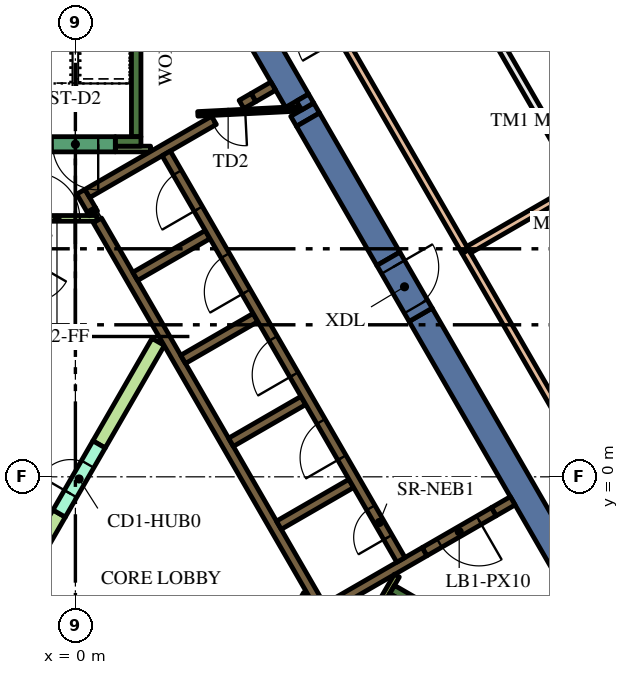
"""IFC4 building model, lengths in metres.
Left out: names, types, materials, properties, quantities, classifications, styles, units other than length and angle.
Written with IfcOpenShell. Run it as: python <this file> out.ifc"""

import sys

from ifc_helpers import new_model, si_unit, direction, frame, frame_2d, origin, place, context, subcontext, project, spatial, polyline, rectangle, outline, extrude, element, fill, save


model = new_model("IFC4")
c1 = context("Model", 3, precision=1e-05, world=origin(), true_north=direction((0.0, 1.0)))
c2 = subcontext(c1, "Body", "Model", "MODEL_VIEW")
j1 = project(units=[si_unit("LENGTHUNIT", "METRE"), si_unit("PLANEANGLEUNIT", "RADIAN")], contexts=[c1])
p1 = place(None, origin())
s1 = spatial("IfcSite", under=j1, at=p1, CompositionType="ELEMENT")
p2 = place(p1, origin())
s2 = spatial("IfcBuilding", under=s1, at=p2, CompositionType="ELEMENT")
p3 = place(p2, frame((0.0, 0.0, 261.6)))
s3 = spatial("IfcBuildingStorey", under=s2, at=p3, CompositionType="ELEMENT", Elevation=261.6)
p4 = place(p3, frame((9.085, 4.264, 0.0), z_axis=(0.0, 0.0, 1.0), x_axis=(0.499998082512, -0.866026510844, 0.0)))
e1 = element("IfcWall", 1, at=p4, inside=s3, PredefinedType="SOLIDWALL", context=c2, shape_type="SweptSolid", body=[
    extrude(rectangle(XDim=12.472, YDim=0.7, at=frame_2d((6.236, 0.0))), origin(), (0.0, 0.0, 1.0), 5.4),
])
p5 = place(p3, frame((6.12, 9.399, 0.0), z_axis=(0.0, 0.0, 1.0), x_axis=(-0.499792463624, 0.866145191815, 0.0)))
e2 = element("IfcWall", 2, at=p5, inside=s3, PredefinedType="SOLIDWALL", context=c2, shape_type="SweptSolid", body=[
    extrude(rectangle(XDim=0.302, YDim=0.7, at=frame_2d((0.151, 0.0))), origin(), (0.0, 0.0, 1.0), 5.4),
])
p6 = place(p3, frame((5.833, 9.896, 0.0), z_axis=(0.0, 0.0, 1.0), x_axis=(-0.499987949039, 0.866032361298, 0.0)))
e3 = element("IfcWall", 3, at=p6, inside=s3, PredefinedType="SOLIDWALL", context=c2, shape_type="SweptSolid", body=[
    extrude(rectangle(XDim=7.668, YDim=0.7, at=frame_2d((3.834, 0.0))), origin(), (0.0, 0.0, 1.0), 5.4),
])
p7 = place(p3, origin())
e4 = element("IfcWall", 4, at=p7, inside=s3, PredefinedType="SOLIDWALL", context=c2, shape_type="SweptSolid", body=[
    extrude(outline(polyline([(6.137, 10.07), (6.271, 9.838), (5.952, 9.654), (5.819, 9.886), (6.137, 10.07)])), origin(), (0.0, 0.0, 1.0), 5.4),
])
p8 = place(p3, frame((6.121, 9.398, 0.0), z_axis=(0.0, 0.0, 1.0), x_axis=(0.499995697976, -0.866027887545, 0.0)))
e5 = element("IfcWall", 5, at=p8, inside=s3, PredefinedType="SOLIDWALL", context=c2, shape_type="SweptSolid", body=[
    extrude(rectangle(XDim=4.228, YDim=0.7, at=frame_2d((2.114, 0.0))), origin(), (0.0, 0.0, 1.0), 5.4),
])
p9 = place(p3, frame((8.334, -2.964, 0.0), z_axis=(0.0, 0.0, 1.0), x_axis=(0.866016039709, -0.500016218704, 0.0)))
e6 = element("IfcWall", 6, at=p9, inside=s3, PredefinedType="SOLIDWALL", context=c2, shape_type="SweptSolid", body=[
    extrude(rectangle(XDim=7.05, YDim=0.25, at=frame_2d((3.525, 0.0))), origin(), (0.0, 0.0, 1.0), 5.4),
])
p10 = place(p3, frame((8.168, -3.503, 0.0), z_axis=(0.0, 0.0, 1.0), x_axis=(0.49972245349, 0.866185586049, 0.0)))
e7 = element("IfcWall", 7, at=p10, inside=s3, PredefinedType="SOLIDWALL", context=c2, shape_type="SweptSolid", body=[
    extrude(rectangle(XDim=0.425, YDim=0.25, at=frame_2d((0.212, 0.0))), origin(), (0.0, 0.0, 1.0), 5.4),
])
p11 = place(p3, frame((1.6, 8.95, 0.0), z_axis=(0.0, 0.0, 1.0), x_axis=(0.0, 1.0, 0.0)))
e8 = element("IfcWall", 8, at=p11, inside=s3, PredefinedType="SOLIDWALL", context=c2, shape_type="SweptSolid", body=[
    extrude(rectangle(XDim=6.8, YDim=0.25, at=frame_2d((3.4, 0.0))), origin(), (0.0, 0.0, 1.0), 5.4),
])
p12 = place(p3, frame((1.05, 8.825, 0.0), z_axis=(0.0, 0.0, 1.0), x_axis=(1.0, 0.0, 0.0)))
e9 = element("IfcWall", 9, at=p12, inside=s3, PredefinedType="SOLIDWALL", context=c2, shape_type="SweptSolid", body=[
    extrude(rectangle(XDim=0.675, YDim=0.25, at=frame_2d((0.337, 0.0))), origin(), (0.0, 0.0, 1.0), 5.4),
])
p13 = place(p3, frame((11.507, -0.631, 0.0), z_axis=(0.0, 0.0, 1.0), x_axis=(-0.866093731455, -0.499881634324, 0.0)))
e10 = element("IfcWall", 10, at=p13, inside=s3, PredefinedType="SOLIDWALL", context=c2, shape_type="SweptSolid", body=[
    extrude(rectangle(XDim=0.575, YDim=0.25, at=frame_2d((0.288, 0.0))), origin(), (0.0, 0.0, 1.0), 5.4),
])
p14 = place(p3, frame((0.473, 6.93, 0.0), z_axis=(0.0, 0.0, 1.0), x_axis=(-0.49972245349, 0.866185586049, 0.0)))
e11 = element("IfcWall", 11, at=p14, inside=s3, PredefinedType="SOLIDWALL", context=c2, shape_type="SweptSolid", body=[
    extrude(rectangle(XDim=0.11, YDim=0.25, at=frame_2d((0.055, 0.0))), origin(), (0.0, 0.0, 1.0), 5.4),
])
p15 = place(p3, frame((6.568, -3.627, 0.0), z_axis=(0.0, 0.0, 1.0), x_axis=(-0.499999455981, 0.866025717874, 0.0)))
e12 = element("IfcWall", 12, at=p15, inside=s3, PredefinedType="SOLIDWALL", context=c2, shape_type="SweptSolid", body=[
    extrude(rectangle(XDim=11.978, YDim=0.25, at=frame_2d((5.989, 0.0))), origin(), (0.0, 0.0, 1.0), 5.4),
])
p16 = place(p3, frame((0.417, 7.027, 0.0), z_axis=(0.0, 0.0, 1.0), x_axis=(-0.500210807569, 0.865903659763, 0.0)))
e13 = element("IfcWall", 13, at=p16, inside=s3, PredefinedType="SOLIDWALL", context=c2, shape_type="SweptSolid", body=[
    extrude(rectangle(XDim=0.548, YDim=0.25, at=frame_2d((0.274, 0.0))), origin(), (0.0, 0.0, 1.0), 5.4),
])
p17 = place(p3, frame((3.647, 9.38, 0.0), z_axis=(0.0, 0.0, 1.0), x_axis=(-0.866025015791, -0.500000672024, 0.0)))
e14 = element("IfcWall", 14, at=p17, inside=s3, PredefinedType="SOLIDWALL", context=c2, shape_type="SweptSolid", body=[
    extrude(rectangle(XDim=3.849, YDim=0.25, at=frame_2d((1.924, 0.0))), origin(), (0.0, 0.0, 1.0), 5.4),
])
p18 = place(p3, frame((1.574, 5.274, 0.0), z_axis=(0.0, 0.0, 1.0), x_axis=(0.866028486751, 0.499994660107, 0.0)))
e15 = element("IfcWall", 15, at=p18, inside=s3, PredefinedType="SOLIDWALL", context=c2, shape_type="SweptSolid", body=[
    extrude(rectangle(XDim=2.2, YDim=0.25, at=frame_2d((1.1, 0.0))), origin(), (0.0, 0.0, 1.0), 5.4),
])
for number, where, z_axis, x_axis in (
    (16, (2.834, 3.091, 0.0), (0.0, 0.0, 1.0), (0.866, 0.5, 0.0)),
    (17, (4.094, 0.909, 0.0), (0.0, 0.0, 1.0), (0.866, 0.5, 0.0)),
    (18, (5.354, -1.274, 0.0), (0.0, 0.0, 1.0), (0.866, 0.5, 0.0)),
):
    element("IfcWall", number, at=place(p3, frame(where, z_axis=z_axis, x_axis=x_axis)), inside=s3, PredefinedType="SOLIDWALL", context=c2, shape_type="SweptSolid", body=[
        extrude(rectangle(XDim=2.2, YDim=0.25, at=frame_2d((1.1, 0.0))), origin(), (0.0, 0.0, 1.0), 5.4),
    ])
p19 = place(p3, frame((6.614, -3.456, 0.0), z_axis=(0.0, 0.0, 1.0), x_axis=(0.866032512851, 0.499987686533, 0.0)))
e19 = element("IfcWall", 19, at=p19, inside=s3, PredefinedType="SOLIDWALL", context=c2, shape_type="SweptSolid", body=[
    extrude(rectangle(XDim=2.975, YDim=0.25, at=frame_2d((1.487, 0.0))), origin(), (0.0, 0.0, 1.0), 5.4),
])
p20 = place(p3, frame((4.688, 9.981, 0.0), z_axis=(0.0, 0.0, 1.0), x_axis=(-0.865974312977, -0.500088481434, 0.0)))
e20 = element("IfcWall", 20, at=p20, inside=s3, PredefinedType="SOLIDWALL", context=c2, shape_type="SweptSolid", body=[
    extrude(rectangle(XDim=0.366, YDim=0.25, at=frame_2d((0.183, 0.0))), origin(), (0.0, 0.0, 1.0), 5.4),
])
p21 = place(p3, frame((4.689, 9.982, 0.0), z_axis=(0.0, 0.0, 1.0), x_axis=(0.865947592822, 0.500134748329, 0.0)))
e21 = element("IfcWall", 21, at=p21, inside=s3, PredefinedType="SOLIDWALL", context=c2, shape_type="SweptSolid", body=[
    extrude(rectangle(XDim=0.598, YDim=0.25, at=frame_2d((0.299, 0.0))), origin(), (0.0, 0.0, 1.0), 5.4),
])
p22 = place(p3, frame((1.05, 8.625, 0.0), z_axis=(0.0, 0.0, 1.0), x_axis=(1.0, 0.0, 0.0)))
e22 = element("IfcWall", 22, at=p22, inside=s3, PredefinedType="PARTITIONING", context=c2, shape_type="SweptSolid", body=[
    extrude(rectangle(XDim=0.929, YDim=0.15, at=frame_2d((0.464, 0.0))), origin(), (0.0, 0.0, 1.0), 4.75),
])
p23 = place(p3, frame((8.459, -2.599, 0.0), z_axis=(0.0, 0.0, 1.0), x_axis=(-0.500041054325, -0.866001699761, 0.0)))
e23 = element("IfcWall", 23, at=p23, inside=s3, PredefinedType="PARTITIONING", context=c2, shape_type="SweptSolid", body=[
    extrude(rectangle(XDim=0.929, YDim=0.15, at=frame_2d((0.464, 0.0))), origin(), (0.0, 0.0, 1.0), 5.4),
])
p24 = place(p3, frame((5.705, -3.718, 0.0), z_axis=(0.0, 0.0, 1.0), x_axis=(0.499962090823, 0.866047289552, 0.0)))
e24 = element("IfcWall", 24, at=p24, inside=s3, PredefinedType="PARTITIONING", context=c2, shape_type="SweptSolid", body=[
    extrude(rectangle(XDim=0.735, YDim=0.15, at=frame_2d((0.367, 0.0))), origin(), (0.0, 0.0, 1.0), 4.75),
])
e25 = element("IfcWall", 25, at=p7, inside=s3, PredefinedType="PARTITIONING", context=c2, shape_type="SweptSolid", body=[
    extrude(outline(polyline([(2.017, 3.643), (2.342, 3.456), (0.785, 0.76), (0.46, 0.947), (2.017, 3.643)])), origin(), (0.0, 0.0, 1.0), 4.75),
])
e26 = element("IfcWall", 26, at=p7, inside=s3, PredefinedType="PARTITIONING", context=c2, shape_type="SweptSolid", body=[
    extrude(outline(polyline([(-0.59, -0.872), (-0.265, -1.059), (-1.822, -3.756), (-2.147, -3.568), (-0.59, -0.872)])), origin(), (0.0, 0.0, 1.0), 4.75),
])
p25 = place(p3, frame((8.565, -2.185, 0.0), z_axis=(0.0, 0.0, 1.0), x_axis=(-0.499997954832, 0.866026584559, 0.0)))
e27 = element("IfcWall", 27, at=p25, inside=s3, PredefinedType="SOLIDWALL", context=c2, shape_type="SweptSolid", body=[
    extrude(rectangle(XDim=12.35, YDim=0.25, at=frame_2d((6.175, 0.0))), origin(), (0.0, 0.0, 1.0), 5.4),
])
p26 = place(p25, frame((0.685, 0.0, 0.0)))
e28 = element("IfcOpeningElement", 28, at=p26, cuts=e27, PredefinedType="OPENING", context=c2, shape_type="SweptSolid", body=[
    extrude(rectangle(XDim=0.9, YDim=2.1, at=frame_2d((0.45, 1.05))), frame((0.0, 0.135, 0.0), z_axis=(0.0, -1.0, 0.0), x_axis=(1.0, 0.0, 0.0)), (0.0, 0.0, 1.0), 0.27),
])
p27 = place(p25, frame((3.105, 0.0, 0.0)))
e29 = element("IfcOpeningElement", 29, at=p27, cuts=e27, PredefinedType="OPENING", context=c2, shape_type="SweptSolid", body=[
    extrude(rectangle(XDim=1.1, YDim=2.1, at=frame_2d((0.55, 1.05))), frame((0.0, 0.135, 0.0), z_axis=(0.0, -1.0, 0.0), x_axis=(1.0, 0.0, 0.0)), (0.0, 0.0, 1.0), 0.27),
])
p28 = place(p25, frame((5.625, 0.0, 0.0)))
e30 = element("IfcOpeningElement", 30, at=p28, cuts=e27, PredefinedType="OPENING", context=c2, shape_type="SweptSolid", body=[
    extrude(rectangle(XDim=1.1, YDim=2.1, at=frame_2d((0.55, 1.05))), frame((0.0, 0.135, 0.0), z_axis=(0.0, -1.0, 0.0), x_axis=(1.0, 0.0, 0.0)), (0.0, 0.0, 1.0), 0.27),
])
p29 = place(p25, frame((8.145, 0.0, 0.0)))
e31 = element("IfcOpeningElement", 31, at=p29, cuts=e27, PredefinedType="OPENING", context=c2, shape_type="SweptSolid", body=[
    extrude(rectangle(XDim=1.1, YDim=2.1, at=frame_2d((0.55, 1.05))), frame((0.0, 0.135, 0.0), z_axis=(0.0, -1.0, 0.0), x_axis=(1.0, 0.0, 0.0)), (0.0, 0.0, 1.0), 0.27),
])
p30 = place(p25, frame((10.665, 0.0, 0.0)))
e32 = element("IfcOpeningElement", 32, at=p30, cuts=e27, PredefinedType="OPENING", context=c2, shape_type="SweptSolid", body=[
    extrude(rectangle(XDim=1.1, YDim=2.1, at=frame_2d((0.55, 1.05))), frame((0.0, 0.135, 0.0), z_axis=(0.0, -1.0, 0.0), x_axis=(1.0, 0.0, 0.0)), (0.0, 0.0, 1.0), 0.27),
])
p31 = place(p3, frame((1.05, 8.75, 0.0), z_axis=(0.0, 0.0, 1.0), x_axis=(-1.0, 0.0, 0.0)))
e33 = element("IfcWall", 33, at=p31, inside=s3, PredefinedType="SOLIDWALL", context=c2, shape_type="SweptSolid", body=[
    extrude(rectangle(XDim=2.1, YDim=0.4, at=frame_2d((1.05, 0.0))), origin(), (0.0, 0.0, 1.0), 5.4),
])
p32 = place(p31, frame((0.45, 0.0, 0.0)))
e34 = element("IfcOpeningElement", 34, at=p32, cuts=e33, PredefinedType="OPENING", context=c2, shape_type="SweptSolid", body=[
    extrude(rectangle(XDim=1.2, YDim=2.1, at=frame_2d((0.6, 1.05))), frame((0.0, 0.21, 0.0), z_axis=(0.0, -1.0, 0.0), x_axis=(1.0, 0.0, 0.0)), (0.0, 0.0, 1.0), 0.42),
])
p33 = place(p3, frame((5.917, 9.684, 0.0), z_axis=(0.0, 0.0, 1.0), x_axis=(-0.998758194515, -0.049820366212, 0.0)))
e35 = element("IfcWall", 35, at=p33, inside=s3, PredefinedType="PARTITIONING", context=c2, shape_type="SweptSolid", body=[
    extrude(rectangle(XDim=2.7, YDim=0.12, at=frame_2d((1.35, 0.0))), origin(), (0.0, 0.0, 1.0), 4.75),
])
p34 = place(p33, frame((1.45, 0.0, 0.0)))
e36 = element("IfcOpeningElement", 36, at=p34, cuts=e35, PredefinedType="OPENING", context=c2, shape_type="SweptSolid", body=[
    extrude(rectangle(XDim=0.9, YDim=2.1, at=frame_2d((0.45, 1.05))), frame((0.0, 0.07, 0.0), z_axis=(0.0, -1.0, 0.0), x_axis=(1.0, 0.0, 0.0)), (0.0, 0.0, 1.0), 0.14),
])
p35 = place(p3, frame((-0.427, -0.966, 0.0), z_axis=(0.0, 0.0, 1.0), x_axis=(0.49994051562, 0.866059744384, 0.0)))
e37 = element("IfcWall", 37, at=p35, inside=s3, PredefinedType="PARTITIONING", context=c2, shape_type="SweptSolid", body=[
    extrude(rectangle(XDim=2.1, YDim=0.375, at=frame_2d((1.05, 0.0))), origin(), (0.0, 0.0, 1.0), 4.75),
])
p36 = place(p35, frame((0.6, 0.0, 0.0)))
e38 = element("IfcOpeningElement", 38, at=p36, cuts=e37, PredefinedType="OPENING", context=c2, shape_type="SweptSolid", body=[
    extrude(rectangle(XDim=0.9, YDim=2.1, at=frame_2d((0.45, 1.05))), frame((0.0, 0.198, 0.0), z_axis=(0.0, -1.0, 0.0), x_axis=(1.0, 0.0, 0.0)), (0.0, 0.0, 1.0), 0.395),
])
p37 = place(p3, frame((-1.534, 6.8, 0.0), z_axis=(0.0, 0.0, 1.0), x_axis=(1.0, 0.0, 0.0)))
e39 = element("IfcWall", 39, at=p37, inside=s3, PredefinedType="PARTITIONING", context=c2, shape_type="SweptSolid", body=[
    extrude(rectangle(XDim=2.1, YDim=0.15, at=frame_2d((1.05, 0.0))), origin(), (0.0, 0.0, 1.0), 4.75),
])
p38 = place(p37, frame((0.45, 0.0, 0.0)))
e40 = element("IfcOpeningElement", 40, at=p38, cuts=e39, PredefinedType="OPENING", context=c2, shape_type="SweptSolid", body=[
    extrude(rectangle(XDim=1.2, YDim=2.1, at=frame_2d((0.6, 1.05))), frame((0.0, 0.085, 0.0), z_axis=(0.0, -1.0, 0.0), x_axis=(1.0, 0.0, 0.0)), (0.0, 0.0, 1.0), 0.17),
])
p39 = place(p3, frame((11.009, -0.919, 0.0), z_axis=(0.0, 0.0, 1.0), x_axis=(-0.866059744384, -0.49994051562, 0.0)))
e41 = element("IfcWall", 41, at=p39, inside=s3, PredefinedType="SOLIDWALL", context=c2, shape_type="SweptSolid", body=[
    extrude(rectangle(XDim=2.1, YDim=0.25, at=frame_2d((1.05, 0.0))), origin(), (0.0, 0.0, 1.0), 5.4),
])
p40 = place(p39, frame((0.45, 0.0, 0.0)))
e42 = element("IfcOpeningElement", 42, at=p40, cuts=e41, PredefinedType="OPENING", context=c2, shape_type="SweptSolid", body=[
    extrude(rectangle(XDim=1.2, YDim=2.1, at=frame_2d((0.6, 1.05))), frame((0.0, 0.135, 0.0), z_axis=(0.0, -1.0, 0.0), x_axis=(1.0, 0.0, 0.0)), (0.0, 0.0, 1.0), 0.27),
])
p41 = place(p3, frame((8.235, 5.736, 0.0), z_axis=(0.0, 0.0, 1.0), x_axis=(0.499954529098, -0.86605165483, 0.0)))
e43 = element("IfcWall", 43, at=p41, inside=s3, PredefinedType="SOLIDWALL", context=c2, shape_type="SweptSolid", body=[
    extrude(rectangle(XDim=1.7, YDim=0.7, at=frame_2d((0.85, 0.0))), origin(), (0.0, 0.0, 1.0), 5.4),
])
p42 = place(p41, frame((0.25, 0.0, 0.0)))
e44 = element("IfcOpeningElement", 44, at=p42, cuts=e43, PredefinedType="OPENING", context=c2, shape_type="SweptSolid", body=[
    extrude(rectangle(XDim=1.2, YDim=2.1, at=frame_2d((0.6, 1.05))), frame((0.0, 0.36, 0.0), z_axis=(0.0, -1.0, 0.0), x_axis=(1.0, 0.0, 0.0)), (0.0, 0.0, 1.0), 0.72),
])
p43 = place(p3, frame((17.349, -6.35, 0.0), z_axis=(0.0, 0.0, 1.0), x_axis=(-0.499997784101, 0.866026683131, 0.0)))
e45 = element("IfcWall", 45, at=p43, inside=s3, PredefinedType="PARTITIONING", context=c2, shape_type="SweptSolid", body=[
    extrude(rectangle(XDim=14.174, YDim=0.2, at=frame_2d((7.087, 0.0))), origin(), (0.0, 0.0, 1.0), 4.75),
])
p44 = place(p43, frame((6.487, 0.0, 0.0)))
e46 = element("IfcOpeningElement", 46, at=p44, cuts=e45, PredefinedType="OPENING", context=c2, shape_type="SweptSolid", body=[
    extrude(rectangle(XDim=1.2, YDim=2.1, at=frame_2d((0.6, 1.05))), frame((0.0, 0.11, 0.0), z_axis=(0.0, -1.0, 0.0), x_axis=(1.0, 0.0, 0.0)), (0.0, 0.0, 1.0), 0.22),
])
p45 = place(p3, frame((10.258, 5.934, 0.0), z_axis=(0.0, 0.0, 1.0), x_axis=(-0.500015389047, 0.866016518732, 0.0)))
e47 = element("IfcWall", 47, at=p45, inside=s3, PredefinedType="PARTITIONING", context=c2, shape_type="SweptSolid", body=[
    extrude(rectangle(XDim=14.164, YDim=0.2, at=frame_2d((7.082, 0.0))), origin(), (0.0, 0.0, 1.0), 4.75),
])
p46 = place(p45, frame((6.482, 0.0, 0.0)))
e48 = element("IfcOpeningElement", 48, at=p46, cuts=e47, PredefinedType="OPENING", context=c2, shape_type="SweptSolid", body=[
    extrude(rectangle(XDim=1.2, YDim=2.1, at=frame_2d((0.6, 1.05))), frame((0.0, 0.11, 0.0), z_axis=(0.0, -1.0, 0.0), x_axis=(1.0, 0.0, 0.0)), (0.0, 0.0, 1.0), 0.22),
])
p47 = place(p3, frame((10.349, 5.975, 0.0), z_axis=(0.0, 0.0, 1.0), x_axis=(0.866022231217, 0.500005495009, 0.0)))
e49 = element("IfcWall", 49, at=p47, inside=s3, PredefinedType="PARTITIONING", context=c2, shape_type="SweptSolid", body=[
    extrude(rectangle(XDim=4.455, YDim=0.2, at=frame_2d((2.228, 0.0))), origin(), (0.0, 0.0, 1.0), 4.75),
])
p48 = place(p26, origin())
e50 = element("IfcDoor", 50, at=p48, inside=s3, OperationType="SINGLE_SWING_LEFT", PredefinedType="DOOR", context=c2, shape_type="SweptSolid", body=[
    extrude(rectangle(XDim=0.9, YDim=2.1, at=frame_2d((0.45, 1.05))), frame((0.0, 0.025, 0.0), z_axis=(0.0, -1.0, 0.0), x_axis=(1.0, 0.0, 0.0)), (0.0, 0.0, 1.0), 0.05),
])
fill(e28, e50)
p49 = place(p27, origin())
e51 = element("IfcDoor", 51, at=p49, inside=s3, OperationType="DOUBLE_DOOR_SLIDING", PredefinedType="DOOR", context=c2, shape_type="SweptSolid", body=[
    extrude(rectangle(XDim=1.1, YDim=2.1, at=frame_2d((0.55, 1.05))), frame((0.0, 0.025, 0.0), z_axis=(0.0, -1.0, 0.0), x_axis=(1.0, 0.0, 0.0)), (0.0, 0.0, 1.0), 0.05),
])
fill(e29, e51)
p50 = place(p28, origin())
e52 = element("IfcDoor", 52, at=p50, inside=s3, OperationType="DOUBLE_DOOR_SLIDING", PredefinedType="DOOR", context=c2, shape_type="SweptSolid", body=[
    extrude(rectangle(XDim=1.1, YDim=2.1, at=frame_2d((0.55, 1.05))), frame((0.0, 0.025, 0.0), z_axis=(0.0, -1.0, 0.0), x_axis=(1.0, 0.0, 0.0)), (0.0, 0.0, 1.0), 0.05),
])
fill(e30, e52)
p51 = place(p29, origin())
e53 = element("IfcDoor", 53, at=p51, inside=s3, OperationType="DOUBLE_DOOR_SLIDING", PredefinedType="DOOR", context=c2, shape_type="SweptSolid", body=[
    extrude(rectangle(XDim=1.1, YDim=2.1, at=frame_2d((0.55, 1.05))), frame((0.0, 0.025, 0.0), z_axis=(0.0, -1.0, 0.0), x_axis=(1.0, 0.0, 0.0)), (0.0, 0.0, 1.0), 0.05),
])
fill(e31, e53)
p52 = place(p30, origin())
e54 = element("IfcDoor", 54, at=p52, inside=s3, OperationType="DOUBLE_DOOR_SLIDING", PredefinedType="DOOR", context=c2, shape_type="SweptSolid", body=[
    extrude(rectangle(XDim=1.1, YDim=2.1, at=frame_2d((0.55, 1.05))), frame((0.0, 0.025, 0.0), z_axis=(0.0, -1.0, 0.0), x_axis=(1.0, 0.0, 0.0)), (0.0, 0.0, 1.0), 0.05),
])
fill(e32, e54)
p53 = place(p32, origin())
e55 = element("IfcDoor", 55, at=p53, inside=s3, OperationType="SINGLE_SWING_LEFT", PredefinedType="DOOR", context=c2, shape_type="SweptSolid", body=[
    extrude(rectangle(XDim=1.2, YDim=2.1, at=frame_2d((0.6, 1.05))), frame((0.0, 0.025, 0.0), z_axis=(0.0, -1.0, 0.0), x_axis=(1.0, 0.0, 0.0)), (0.0, 0.0, 1.0), 0.05),
])
fill(e34, e55)
p54 = place(p34, origin())
e56 = element("IfcDoor", 56, at=p54, inside=s3, OperationType="SINGLE_SWING_LEFT", PredefinedType="DOOR", context=c2, shape_type="SweptSolid", body=[
    extrude(rectangle(XDim=0.9, YDim=2.1, at=frame_2d((0.45, 1.05))), frame((0.0, 0.025, 0.0), z_axis=(0.0, -1.0, 0.0), x_axis=(1.0, 0.0, 0.0)), (0.0, 0.0, 1.0), 0.05),
])
fill(e36, e56)
p55 = place(p36, origin())
e57 = element("IfcDoor", 57, at=p55, inside=s3, OperationType="SINGLE_SWING_LEFT", PredefinedType="DOOR", context=c2, shape_type="SweptSolid", body=[
    extrude(rectangle(XDim=0.9, YDim=2.1, at=frame_2d((0.45, 1.05))), frame((0.0, 0.025, 0.0), z_axis=(0.0, -1.0, 0.0), x_axis=(1.0, 0.0, 0.0)), (0.0, 0.0, 1.0), 0.05),
])
fill(e38, e57)
p56 = place(p38, origin())
e58 = element("IfcDoor", 58, at=p56, inside=s3, OperationType="SINGLE_SWING_LEFT", PredefinedType="DOOR", context=c2, shape_type="SweptSolid", body=[
    extrude(rectangle(XDim=1.2, YDim=2.1, at=frame_2d((0.6, 1.05))), frame((0.0, 0.025, 0.0), z_axis=(0.0, -1.0, 0.0), x_axis=(1.0, 0.0, 0.0)), (0.0, 0.0, 1.0), 0.05),
])
fill(e40, e58)
p57 = place(p40, origin())
e59 = element("IfcDoor", 59, at=p57, inside=s3, OperationType="SINGLE_SWING_LEFT", PredefinedType="DOOR", context=c2, shape_type="SweptSolid", body=[
    extrude(rectangle(XDim=1.2, YDim=2.1, at=frame_2d((0.6, 1.05))), frame((0.0, 0.025, 0.0), z_axis=(0.0, -1.0, 0.0), x_axis=(1.0, 0.0, 0.0)), (0.0, 0.0, 1.0), 0.05),
])
fill(e42, e59)
p58 = place(p42, origin())
e60 = element("IfcDoor", 60, at=p58, inside=s3, OperationType="SINGLE_SWING_LEFT", PredefinedType="DOOR", context=c2, shape_type="SweptSolid", body=[
    extrude(rectangle(XDim=1.2, YDim=2.1, at=frame_2d((0.6, 1.05))), frame((0.0, 0.025, 0.0), z_axis=(0.0, -1.0, 0.0), x_axis=(1.0, 0.0, 0.0)), (0.0, 0.0, 1.0), 0.05),
])
fill(e44, e60)
save(model, sys.argv[1])
